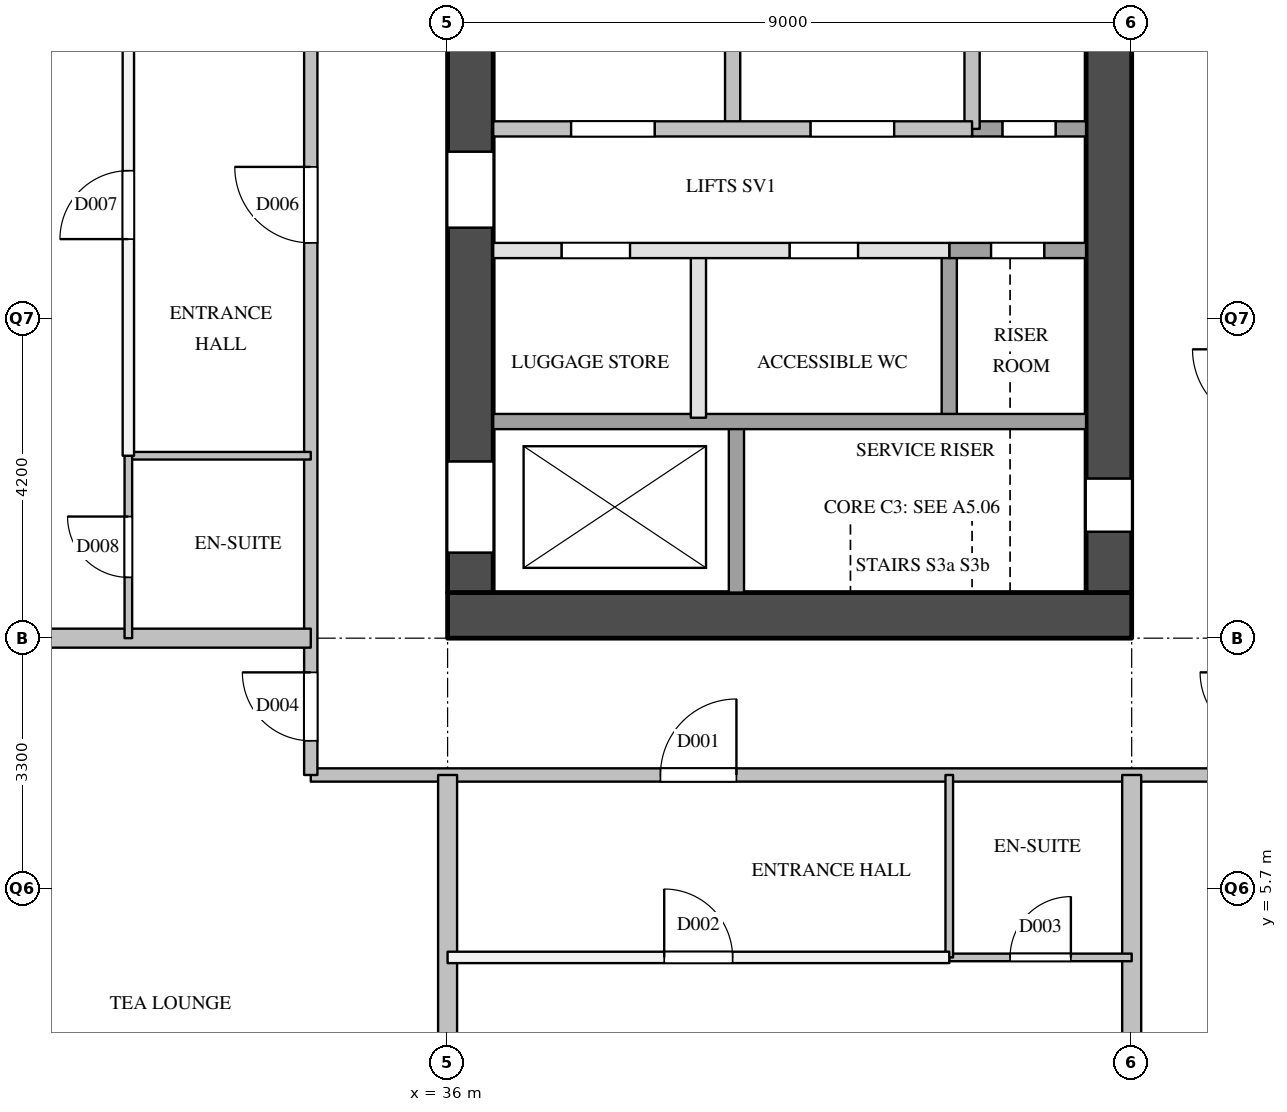
"""IFC4 building model, lengths in metres.
Left out: names, types, materials, properties, quantities, classifications, styles, units other than length and angle.
Written with IfcOpenShell. Run it as: python <this file> out.ifc"""

import sys

from ifc_helpers import new_model, si_unit, direction, frame, frame_2d, origin, place, context, subcontext, project, spatial, rectangle, extrude, element, fill, save


model = new_model("IFC4")
c1 = context("Model", 3, precision=1e-05, world=origin(), true_north=direction((0.0, 1.0)))
c2 = subcontext(c1, "Body", "Model", "MODEL_VIEW")
j1 = project(units=[si_unit("LENGTHUNIT", "METRE"), si_unit("PLANEANGLEUNIT", "RADIAN")], contexts=[c1])
p1 = place(None, origin())
s1 = spatial("IfcSite", under=j1, at=p1, CompositionType="ELEMENT")
p2 = place(p1, origin())
s2 = spatial("IfcBuilding", under=s1, at=p2, CompositionType="ELEMENT")
p3 = place(p2, frame((0.0, 0.0, 104.4)))
s3 = spatial("IfcBuildingStorey", under=s2, at=p3, CompositionType="ELEMENT", Elevation=104.4)
p4 = place(p3, frame((36.0, 9.3, 0.0), z_axis=(0.0, 0.0, 1.0), x_axis=(1.0, 0.0, 0.0)))
e1 = element("IfcWall", 1, at=p4, inside=s3, PredefinedType="SHEAR", context=c2, shape_type="SweptSolid", body=[
    extrude(rectangle(XDim=9.0, YDim=0.6, at=frame_2d((4.5, 0.0))), origin(), (0.0, 0.0, 1.0), 3.5),
])
p5 = place(p3, frame((36.3, 9.6, 0.0), z_axis=(0.0, 0.0, 1.0), x_axis=(0.0, 1.0, 0.0)))
e2 = element("IfcWall", 2, at=p5, inside=s3, PredefinedType="SHEAR", context=c2, shape_type="SweptSolid", body=[
    extrude(rectangle(XDim=12.3, YDim=0.6, at=frame_2d((6.15, 0.0))), origin(), (0.0, 0.0, 1.0), 3.5),
])
p6 = place(p5, frame((0.525, 0.0, 0.0)))
e3 = element("IfcOpeningElement", 3, at=p6, cuts=e2, PredefinedType="OPENING", context=c2, shape_type="SweptSolid", body=[
    extrude(rectangle(XDim=1.2, YDim=2.1, at=frame_2d((0.6, 1.05))), frame((0.0, 0.31, 0.0), z_axis=(0.0, -1.0, 0.0), x_axis=(1.0, 0.0, 0.0)), (0.0, 0.0, 1.0), 0.62),
])
p7 = place(p5, frame((4.8, 0.0, 0.0)))
e4 = element("IfcOpeningElement", 4, at=p7, cuts=e2, PredefinedType="OPENING", context=c2, shape_type="SweptSolid", body=[
    extrude(rectangle(XDim=1.0, YDim=2.1, at=frame_2d((0.5, 1.05))), frame((0.0, 0.31, 0.0), z_axis=(0.0, -1.0, 0.0), x_axis=(1.0, 0.0, 0.0)), (0.0, 0.0, 1.0), 0.62),
])
p8 = place(p3, frame((44.7, 9.6, 0.0), z_axis=(0.0, 0.0, 1.0), x_axis=(0.0, 1.0, 0.0)))
e5 = element("IfcWall", 5, at=p8, inside=s3, PredefinedType="SHEAR", context=c2, shape_type="SweptSolid", body=[
    extrude(rectangle(XDim=12.3, YDim=0.6, at=frame_2d((6.15, 0.0))), origin(), (0.0, 0.0, 1.0), 3.5),
])
p9 = place(p8, frame((0.8, 0.0, 0.0)))
e6 = element("IfcOpeningElement", 6, at=p9, cuts=e5, PredefinedType="OPENING", context=c2, shape_type="SweptSolid", body=[
    extrude(rectangle(XDim=0.7, YDim=2.1, at=frame_2d((0.35, 1.05))), frame((0.0, 0.31, 0.0), z_axis=(0.0, -1.0, 0.0), x_axis=(1.0, 0.0, 0.0)), (0.0, 0.0, 1.0), 0.62),
])
p10 = place(p3, frame((39.3, 11.9, 0.0), z_axis=(0.0, 0.0, 1.0), x_axis=(0.0, 1.0, 0.0)))
e7 = element("IfcWall", 7, at=p10, inside=s3, PredefinedType="PARTITIONING", context=c2, shape_type="SweptSolid", body=[
    extrude(rectangle(XDim=2.2, YDim=0.2, at=frame_2d((1.1, 0.0))), origin(), (0.0, 0.0, 1.0), 3.5),
])
p11 = place(p3, frame((39.75, 15.7, 0.0), z_axis=(0.0, 0.0, 1.0), x_axis=(0.0, 1.0, 0.0)))
e8 = element("IfcWall", 8, at=p11, inside=s3, PredefinedType="SOLIDWALL", context=c2, shape_type="SweptSolid", body=[
    extrude(rectangle(XDim=4.3, YDim=0.2, at=frame_2d((2.15, 0.0))), origin(), (0.0, 0.0, 1.0), 3.5),
])
p12 = place(p3, frame((39.8, 9.6, 0.0), z_axis=(0.0, 0.0, 1.0), x_axis=(0.0, 1.0, 0.0)))
e9 = element("IfcWall", 9, at=p12, inside=s3, PredefinedType="SOLIDWALL", context=c2, shape_type="SweptSolid", body=[
    extrude(rectangle(XDim=2.3, YDim=0.2, at=frame_2d((1.15, 0.0))), origin(), (0.0, 0.0, 1.0), 3.5),
])
p13 = place(p3, frame((42.6, 11.9, 0.0), z_axis=(0.0, 0.0, 1.0), x_axis=(0.0, 1.0, 0.0)))
e10 = element("IfcWall", 10, at=p13, inside=s3, PredefinedType="SOLIDWALL", context=c2, shape_type="SweptSolid", body=[
    extrude(rectangle(XDim=2.2, YDim=0.2, at=frame_2d((1.1, 0.0))), origin(), (0.0, 0.0, 1.0), 3.5),
])
p14 = place(p3, frame((42.9, 15.7, 0.0), z_axis=(0.0, 0.0, 1.0), x_axis=(0.0, 1.0, 0.0)))
e11 = element("IfcWall", 11, at=p14, inside=s3, PredefinedType="SOLIDWALL", context=c2, shape_type="SweptSolid", body=[
    extrude(rectangle(XDim=4.3, YDim=0.2, at=frame_2d((2.15, 0.0))), origin(), (0.0, 0.0, 1.0), 3.5),
])
p15 = place(p3, frame((36.6, 11.85, 0.0), z_axis=(0.0, 0.0, 1.0), x_axis=(1.0, 0.0, 0.0)))
e12 = element("IfcWall", 12, at=p15, inside=s3, PredefinedType="SOLIDWALL", context=c2, shape_type="SweptSolid", body=[
    extrude(rectangle(XDim=7.8, YDim=0.2, at=frame_2d((3.9, 0.0))), origin(), (0.0, 0.0, 1.0), 3.5),
])
p16 = place(p3, frame((36.6, 14.1, 0.0), z_axis=(0.0, 0.0, 1.0), x_axis=(1.0, 0.0, 0.0)))
e13 = element("IfcWall", 13, at=p16, inside=s3, PredefinedType="PARTITIONING", context=c2, shape_type="SweptSolid", body=[
    extrude(rectangle(XDim=6.0, YDim=0.2, at=frame_2d((3.0, 0.0))), origin(), (0.0, 0.0, 1.0), 3.5),
])
p17 = place(p16, frame((0.9, 0.0, 0.0)))
e14 = element("IfcOpeningElement", 14, at=p17, cuts=e13, PredefinedType="OPENING", context=c2, shape_type="SweptSolid", body=[
    extrude(rectangle(XDim=0.9, YDim=2.1, at=frame_2d((0.45, 1.05))), frame((0.0, 0.11, 0.0), z_axis=(0.0, -1.0, 0.0), x_axis=(1.0, 0.0, 0.0)), (0.0, 0.0, 1.0), 0.22),
])
p18 = place(p16, frame((3.9, 0.0, 0.0)))
e15 = element("IfcOpeningElement", 15, at=p18, cuts=e13, PredefinedType="OPENING", context=c2, shape_type="SweptSolid", body=[
    extrude(rectangle(XDim=0.9, YDim=2.1, at=frame_2d((0.45, 1.05))), frame((0.0, 0.11, 0.0), z_axis=(0.0, -1.0, 0.0), x_axis=(1.0, 0.0, 0.0)), (0.0, 0.0, 1.0), 0.22),
])
p19 = place(p3, frame((42.6, 14.1, 0.0), z_axis=(0.0, 0.0, 1.0), x_axis=(1.0, 0.0, 0.0)))
e16 = element("IfcWall", 16, at=p19, inside=s3, PredefinedType="SOLIDWALL", context=c2, shape_type="SweptSolid", body=[
    extrude(rectangle(XDim=1.8, YDim=0.2, at=frame_2d((0.9, 0.0))), origin(), (0.0, 0.0, 1.0), 3.5),
])
p20 = place(p19, frame((0.55, 0.0, 0.0)))
e17 = element("IfcOpeningElement", 17, at=p20, cuts=e16, PredefinedType="OPENING", context=c2, shape_type="SweptSolid", body=[
    extrude(rectangle(XDim=0.7, YDim=2.1, at=frame_2d((0.35, 1.05))), frame((0.0, 0.11, 0.0), z_axis=(0.0, -1.0, 0.0), x_axis=(1.0, 0.0, 0.0)), (0.0, 0.0, 1.0), 0.22),
])
p21 = place(p3, frame((42.9, 15.7, 0.0), z_axis=(0.0, 0.0, 1.0), x_axis=(1.0, 0.0, 0.0)))
e18 = element("IfcWall", 18, at=p21, inside=s3, PredefinedType="SOLIDWALL", context=c2, shape_type="SweptSolid", body=[
    extrude(rectangle(XDim=1.5, YDim=0.2, at=frame_2d((0.75, 0.0))), origin(), (0.0, 0.0, 1.0), 3.5),
])
p22 = place(p21, frame((0.4, 0.0, 0.0)))
e19 = element("IfcOpeningElement", 19, at=p22, cuts=e18, PredefinedType="OPENING", context=c2, shape_type="SweptSolid", body=[
    extrude(rectangle(XDim=0.7, YDim=2.1, at=frame_2d((0.35, 1.05))), frame((0.0, 0.11, 0.0), z_axis=(0.0, -1.0, 0.0), x_axis=(1.0, 0.0, 0.0)), (0.0, 0.0, 1.0), 0.22),
])
p23 = place(p3, frame((36.6, 15.7, 0.0), z_axis=(0.0, 0.0, 1.0), x_axis=(1.0, 0.0, 0.0)))
e20 = element("IfcWall", 20, at=p23, inside=s3, PredefinedType="SOLIDWALL", context=c2, shape_type="SweptSolid", body=[
    extrude(rectangle(XDim=6.3, YDim=0.2, at=frame_2d((3.15, 0.0))), origin(), (0.0, 0.0, 1.0), 3.5),
])
p24 = place(p23, frame((1.025, 0.0, 0.0)))
e21 = element("IfcOpeningElement", 21, at=p24, cuts=e20, PredefinedType="OPENING", context=c2, shape_type="SweptSolid", body=[
    extrude(rectangle(XDim=1.1, YDim=2.1, at=frame_2d((0.55, 1.05))), frame((0.0, 0.11, 0.0), z_axis=(0.0, -1.0, 0.0), x_axis=(1.0, 0.0, 0.0)), (0.0, 0.0, 1.0), 0.22),
])
p25 = place(p23, frame((4.175, 0.0, 0.0)))
e22 = element("IfcOpeningElement", 22, at=p25, cuts=e20, PredefinedType="OPENING", context=c2, shape_type="SweptSolid", body=[
    extrude(rectangle(XDim=1.1, YDim=2.1, at=frame_2d((0.55, 1.05))), frame((0.0, 0.11, 0.0), z_axis=(0.0, -1.0, 0.0), x_axis=(1.0, 0.0, 0.0)), (0.0, 0.0, 1.0), 0.22),
])
p26 = place(p3, frame((34.2, 7.2, 0.0), z_axis=(0.0, 0.0, 1.0), x_axis=(1.0, 0.0, 0.0)))
e23 = element("IfcWall", 23, at=p26, inside=s3, PredefinedType="PARTITIONING", context=c2, shape_type="SweptSolid", body=[
    extrude(rectangle(XDim=12.6, YDim=0.175, at=frame_2d((6.3, 0.0))), origin(), (0.0, 0.0, 1.0), 3.5),
])
p27 = place(p26, frame((4.6, 0.0, 0.0)))
e24 = element("IfcOpeningElement", 24, at=p27, cuts=e23, PredefinedType="OPENING", context=c2, shape_type="SweptSolid", body=[
    extrude(rectangle(XDim=1.0, YDim=2.1, at=frame_2d((0.5, 1.05))), frame((0.0, 0.097, 0.0), z_axis=(0.0, -1.0, 0.0), x_axis=(1.0, 0.0, 0.0)), (0.0, 0.0, 1.0), 0.195),
])
p28 = place(p3, frame((34.2, 7.2, 0.0), z_axis=(0.0, 0.0, 1.0), x_axis=(0.0, 1.0, 0.0)))
e25 = element("IfcWall", 25, at=p28, inside=s3, PredefinedType="PARTITIONING", context=c2, shape_type="SweptSolid", body=[
    extrude(rectangle(XDim=16.49, YDim=0.175, at=frame_2d((8.245, 0.0))), origin(), (0.0, 0.0, 1.0), 3.5),
])
p29 = place(p28, frame((0.45, 0.0, 0.0)))
e26 = element("IfcOpeningElement", 26, at=p29, cuts=e25, PredefinedType="OPENING", context=c2, shape_type="SweptSolid", body=[
    extrude(rectangle(XDim=0.9, YDim=2.1, at=frame_2d((0.45, 1.05))), frame((0.0, 0.097, 0.0), z_axis=(0.0, -1.0, 0.0), x_axis=(1.0, 0.0, 0.0)), (0.0, 0.0, 1.0), 0.195),
])
p30 = place(p28, frame((7.0, 0.0, 0.0)))
e27 = element("IfcOpeningElement", 27, at=p30, cuts=e25, PredefinedType="OPENING", context=c2, shape_type="SweptSolid", body=[
    extrude(rectangle(XDim=1.0, YDim=2.1, at=frame_2d((0.5, 1.05))), frame((0.0, 0.097, 0.0), z_axis=(0.0, -1.0, 0.0), x_axis=(1.0, 0.0, 0.0)), (0.0, 0.0, 1.0), 0.195),
])
p31 = place(p28, frame((14.345, 0.0, 0.0)))
e28 = element("IfcOpeningElement", 28, at=p31, cuts=e25, PredefinedType="OPENING", context=c2, shape_type="SweptSolid", body=[
    extrude(rectangle(XDim=1.0, YDim=2.1, at=frame_2d((0.5, 1.05))), frame((0.0, 0.097, 0.0), z_axis=(0.0, -1.0, 0.0), x_axis=(1.0, 0.0, 0.0)), (0.0, 0.0, 1.0), 0.195),
])
p32 = place(p3, frame((36.0, 4.8, 0.0), z_axis=(0.0, 0.0, 1.0), x_axis=(1.0, 0.0, 0.0)))
e29 = element("IfcWall", 29, at=p32, inside=s3, PredefinedType="PARTITIONING", context=c2, shape_type="SweptSolid", body=[
    extrude(rectangle(XDim=6.6, YDim=0.15, at=frame_2d((3.3, 0.0))), origin(), (0.0, 0.0, 1.0), 3.5),
])
p33 = place(p32, frame((2.85, 0.0, 0.0)))
e30 = element("IfcOpeningElement", 30, at=p33, cuts=e29, PredefinedType="OPENING", context=c2, shape_type="SweptSolid", body=[
    extrude(rectangle(XDim=0.9, YDim=2.1, at=frame_2d((0.45, 1.05))), frame((0.0, 0.085, 0.0), z_axis=(0.0, -1.0, 0.0), x_axis=(1.0, 0.0, 0.0)), (0.0, 0.0, 1.0), 0.17),
])
p34 = place(p3, frame((31.8, 11.4, 0.0), z_axis=(0.0, 0.0, 1.0), x_axis=(0.0, 1.0, 0.0)))
e31 = element("IfcWall", 31, at=p34, inside=s3, PredefinedType="PARTITIONING", context=c2, shape_type="SweptSolid", body=[
    extrude(rectangle(XDim=6.6, YDim=0.15, at=frame_2d((3.3, 0.0))), origin(), (0.0, 0.0, 1.0), 3.5),
])
p35 = place(p34, frame((2.85, 0.0, 0.0)))
e32 = element("IfcOpeningElement", 32, at=p35, cuts=e31, PredefinedType="OPENING", context=c2, shape_type="SweptSolid", body=[
    extrude(rectangle(XDim=0.9, YDim=2.1, at=frame_2d((0.45, 1.05))), frame((0.0, 0.085, 0.0), z_axis=(0.0, -1.0, 0.0), x_axis=(1.0, 0.0, 0.0)), (0.0, 0.0, 1.0), 0.17),
])
for number, where, z_axis, x_axis in (
    (33, (27.0, 9.0, 0.0), (0.0, 0.0, 1.0), (1.0, 0.0, 0.0)),
    (34, (36.0, 0.0, 0.0), (0.0, 0.0, 1.0), (0.0, 1.0, 0.0)),
    (35, (45.0, 0.0, 0.0), (0.0, 0.0, 1.0), (0.0, 1.0, 0.0)),
):
    element("IfcWall", number, at=place(p3, frame(where, z_axis=z_axis, x_axis=x_axis)), inside=s3, PredefinedType="PARTITIONING", context=c2, shape_type="SweptSolid", body=[
        extrude(rectangle(XDim=7.2, YDim=0.25, at=frame_2d((3.6, 0.0))), origin(), (0.0, 0.0, 1.0), 3.5),
    ])
p36 = place(p3, frame((42.6, 4.8, 0.0), z_axis=(0.0, 0.0, 1.0), x_axis=(1.0, 0.0, 0.0)))
e36 = element("IfcWall", 36, at=p36, inside=s3, PredefinedType="PARTITIONING", context=c2, shape_type="SweptSolid", body=[
    extrude(rectangle(XDim=2.4, YDim=0.1, at=frame_2d((1.2, 0.0))), origin(), (0.0, 0.0, 1.0), 3.5),
])
p37 = place(p36, frame((0.8, 0.0, 0.0)))
e37 = element("IfcOpeningElement", 37, at=p37, cuts=e36, PredefinedType="OPENING", context=c2, shape_type="SweptSolid", body=[
    extrude(rectangle(XDim=0.8, YDim=2.1, at=frame_2d((0.4, 1.05))), frame((0.0, 0.06, 0.0), z_axis=(0.0, -1.0, 0.0), x_axis=(1.0, 0.0, 0.0)), (0.0, 0.0, 1.0), 0.12),
])
p38 = place(p3, frame((31.8, 11.4, 0.0), z_axis=(0.0, 0.0, 1.0), x_axis=(1.0, 0.0, 0.0)))
e38 = element("IfcWall", 38, at=p38, inside=s3, PredefinedType="PARTITIONING", context=c2, shape_type="SweptSolid", body=[
    extrude(rectangle(XDim=2.4, YDim=0.1, at=frame_2d((1.2, 0.0))), origin(), (0.0, 0.0, 1.0), 3.5),
])
p39 = place(p3, frame((31.8, 9.0, 0.0), z_axis=(0.0, 0.0, 1.0), x_axis=(0.0, 1.0, 0.0)))
e39 = element("IfcWall", 39, at=p39, inside=s3, PredefinedType="PARTITIONING", context=c2, shape_type="SweptSolid", body=[
    extrude(rectangle(XDim=2.4, YDim=0.1, at=frame_2d((1.2, 0.0))), origin(), (0.0, 0.0, 1.0), 3.5),
])
p40 = place(p39, frame((0.8, 0.0, 0.0)))
e40 = element("IfcOpeningElement", 40, at=p40, cuts=e39, PredefinedType="OPENING", context=c2, shape_type="SweptSolid", body=[
    extrude(rectangle(XDim=0.8, YDim=2.1, at=frame_2d((0.4, 1.05))), frame((0.0, 0.06, 0.0), z_axis=(0.0, -1.0, 0.0), x_axis=(1.0, 0.0, 0.0)), (0.0, 0.0, 1.0), 0.12),
])
p41 = place(p3, frame((42.6, 4.8, 0.0), z_axis=(0.0, 0.0, 1.0), x_axis=(0.0, 1.0, 0.0)))
e41 = element("IfcWall", 41, at=p41, inside=s3, PredefinedType="PARTITIONING", context=c2, shape_type="SweptSolid", body=[
    extrude(rectangle(XDim=2.4, YDim=0.1, at=frame_2d((1.2, 0.0))), origin(), (0.0, 0.0, 1.0), 3.5),
])
p42 = place(p6, origin())
e42 = element("IfcDoor", 42, at=p42, inside=s3, OperationType="SLIDING_TO_LEFT", PredefinedType="DOOR", context=c2, shape_type="SweptSolid", body=[
    extrude(rectangle(XDim=1.2, YDim=2.1, at=frame_2d((0.6, 1.05))), frame((0.0, 0.025, 0.0), z_axis=(0.0, -1.0, 0.0), x_axis=(1.0, 0.0, 0.0)), (0.0, 0.0, 1.0), 0.05),
])
fill(e3, e42)
p43 = place(p24, origin())
e43 = element("IfcDoor", 43, at=p43, inside=s3, OperationType="SINGLE_SWING_LEFT", PredefinedType="DOOR", context=c2, shape_type="SweptSolid", body=[
    extrude(rectangle(XDim=1.1, YDim=2.1, at=frame_2d((0.55, 1.05))), frame((0.0, 0.025, 0.0), z_axis=(0.0, -1.0, 0.0), x_axis=(1.0, 0.0, 0.0)), (0.0, 0.0, 1.0), 0.05),
])
fill(e21, e43)
p44 = place(p25, origin())
e44 = element("IfcDoor", 44, at=p44, inside=s3, OperationType="SINGLE_SWING_RIGHT", PredefinedType="DOOR", context=c2, shape_type="SweptSolid", body=[
    extrude(rectangle(XDim=1.1, YDim=2.1, at=frame_2d((0.55, 1.05))), frame((0.0, 0.025, 0.0), z_axis=(0.0, -1.0, 0.0), x_axis=(1.0, 0.0, 0.0)), (0.0, 0.0, 1.0), 0.05),
])
fill(e22, e44)
p45 = place(p22, origin())
e45 = element("IfcDoor", 45, at=p45, inside=s3, OperationType="SINGLE_SWING_LEFT", PredefinedType="DOOR", context=c2, shape_type="SweptSolid", body=[
    extrude(rectangle(XDim=0.7, YDim=2.1, at=frame_2d((0.35, 1.05))), frame((0.0, 0.025, 0.0), z_axis=(0.0, -1.0, 0.0), x_axis=(1.0, 0.0, 0.0)), (0.0, 0.0, 1.0), 0.05),
])
fill(e19, e45)
p46 = place(p20, origin())
e46 = element("IfcDoor", 46, at=p46, inside=s3, OperationType="SINGLE_SWING_RIGHT", PredefinedType="DOOR", context=c2, shape_type="SweptSolid", body=[
    extrude(rectangle(XDim=0.7, YDim=2.1, at=frame_2d((0.35, 1.05))), frame((0.0, 0.025, 0.0), z_axis=(0.0, -1.0, 0.0), x_axis=(1.0, 0.0, 0.0)), (0.0, 0.0, 1.0), 0.05),
])
fill(e17, e46)
p47 = place(p9, origin())
e47 = element("IfcDoor", 47, at=p47, inside=s3, OperationType="SINGLE_SWING_LEFT", PredefinedType="DOOR", context=c2, shape_type="SweptSolid", body=[
    extrude(rectangle(XDim=0.7, YDim=2.1, at=frame_2d((0.35, 1.05))), frame((0.0, 0.025, 0.0), z_axis=(0.0, -1.0, 0.0), x_axis=(1.0, 0.0, 0.0)), (0.0, 0.0, 1.0), 0.05),
])
fill(e6, e47)
p48 = place(p7, origin())
e48 = element("IfcDoor", 48, at=p48, inside=s3, OperationType="SINGLE_SWING_LEFT", PredefinedType="DOOR", context=c2, shape_type="SweptSolid", body=[
    extrude(rectangle(XDim=1.0, YDim=2.1, at=frame_2d((0.5, 1.05))), frame((0.0, 0.025, 0.0), z_axis=(0.0, -1.0, 0.0), x_axis=(1.0, 0.0, 0.0)), (0.0, 0.0, 1.0), 0.05),
])
fill(e4, e48)
p49 = place(p17, origin())
e49 = element("IfcDoor", 49, at=p49, inside=s3, OperationType="SINGLE_SWING_LEFT", PredefinedType="DOOR", context=c2, shape_type="SweptSolid", body=[
    extrude(rectangle(XDim=0.9, YDim=2.1, at=frame_2d((0.45, 1.05))), frame((0.0, 0.025, 0.0), z_axis=(0.0, -1.0, 0.0), x_axis=(1.0, 0.0, 0.0)), (0.0, 0.0, 1.0), 0.05),
])
fill(e14, e49)
p50 = place(p18, origin())
e50 = element("IfcDoor", 50, at=p50, inside=s3, OperationType="SINGLE_SWING_RIGHT", PredefinedType="DOOR", context=c2, shape_type="SweptSolid", body=[
    extrude(rectangle(XDim=0.9, YDim=2.1, at=frame_2d((0.45, 1.05))), frame((0.0, 0.025, 0.0), z_axis=(0.0, -1.0, 0.0), x_axis=(1.0, 0.0, 0.0)), (0.0, 0.0, 1.0), 0.05),
])
fill(e15, e50)
p51 = place(p27, origin())
e51 = element("IfcDoor", 51, at=p51, inside=s3, OperationType="SINGLE_SWING_RIGHT", PredefinedType="DOOR", context=c2, shape_type="SweptSolid", body=[
    extrude(rectangle(XDim=1.0, YDim=2.1, at=frame_2d((0.5, 1.05))), frame((0.0, 0.025, 0.0), z_axis=(0.0, -1.0, 0.0), x_axis=(1.0, 0.0, 0.0)), (0.0, 0.0, 1.0), 0.05),
])
fill(e24, e51)
p52 = place(p33, origin())
e52 = element("IfcDoor", 52, at=p52, inside=s3, OperationType="SINGLE_SWING_LEFT", PredefinedType="DOOR", context=c2, shape_type="SweptSolid", body=[
    extrude(rectangle(XDim=0.9, YDim=2.1, at=frame_2d((0.45, 1.05))), frame((0.0, 0.025, 0.0), z_axis=(0.0, -1.0, 0.0), x_axis=(1.0, 0.0, 0.0)), (0.0, 0.0, 1.0), 0.05),
])
fill(e30, e52)
p53 = place(p37, origin())
e53 = element("IfcDoor", 53, at=p53, inside=s3, OperationType="SINGLE_SWING_RIGHT", PredefinedType="DOOR", context=c2, shape_type="SweptSolid", body=[
    extrude(rectangle(XDim=0.8, YDim=2.1, at=frame_2d((0.4, 1.05))), frame((0.0, 0.025, 0.0), z_axis=(0.0, -1.0, 0.0), x_axis=(1.0, 0.0, 0.0)), (0.0, 0.0, 1.0), 0.05),
])
fill(e37, e53)
p54 = place(p29, origin())
e54 = element("IfcDoor", 54, at=p54, inside=s3, OperationType="SINGLE_SWING_RIGHT", PredefinedType="DOOR", context=c2, shape_type="SweptSolid", body=[
    extrude(rectangle(XDim=0.9, YDim=2.1, at=frame_2d((0.45, 1.05))), frame((0.0, 0.025, 0.0), z_axis=(0.0, -1.0, 0.0), x_axis=(1.0, 0.0, 0.0)), (0.0, 0.0, 1.0), 0.05),
])
fill(e26, e54)
p55 = place(p30, origin())
e55 = element("IfcDoor", 55, at=p55, inside=s3, OperationType="SINGLE_SWING_RIGHT", PredefinedType="DOOR", context=c2, shape_type="SweptSolid", body=[
    extrude(rectangle(XDim=1.0, YDim=2.1, at=frame_2d((0.5, 1.05))), frame((0.0, 0.025, 0.0), z_axis=(0.0, -1.0, 0.0), x_axis=(1.0, 0.0, 0.0)), (0.0, 0.0, 1.0), 0.05),
])
fill(e27, e55)
p56 = place(p35, origin())
e56 = element("IfcDoor", 56, at=p56, inside=s3, OperationType="SINGLE_SWING_LEFT", PredefinedType="DOOR", context=c2, shape_type="SweptSolid", body=[
    extrude(rectangle(XDim=0.9, YDim=2.1, at=frame_2d((0.45, 1.05))), frame((0.0, 0.025, 0.0), z_axis=(0.0, -1.0, 0.0), x_axis=(1.0, 0.0, 0.0)), (0.0, 0.0, 1.0), 0.05),
])
fill(e32, e56)
p57 = place(p40, origin())
e57 = element("IfcDoor", 57, at=p57, inside=s3, OperationType="SINGLE_SWING_RIGHT", PredefinedType="DOOR", context=c2, shape_type="SweptSolid", body=[
    extrude(rectangle(XDim=0.8, YDim=2.1, at=frame_2d((0.4, 1.05))), frame((0.0, 0.025, 0.0), z_axis=(0.0, -1.0, 0.0), x_axis=(1.0, 0.0, 0.0)), (0.0, 0.0, 1.0), 0.05),
])
fill(e40, e57)
save(model, sys.argv[1])
